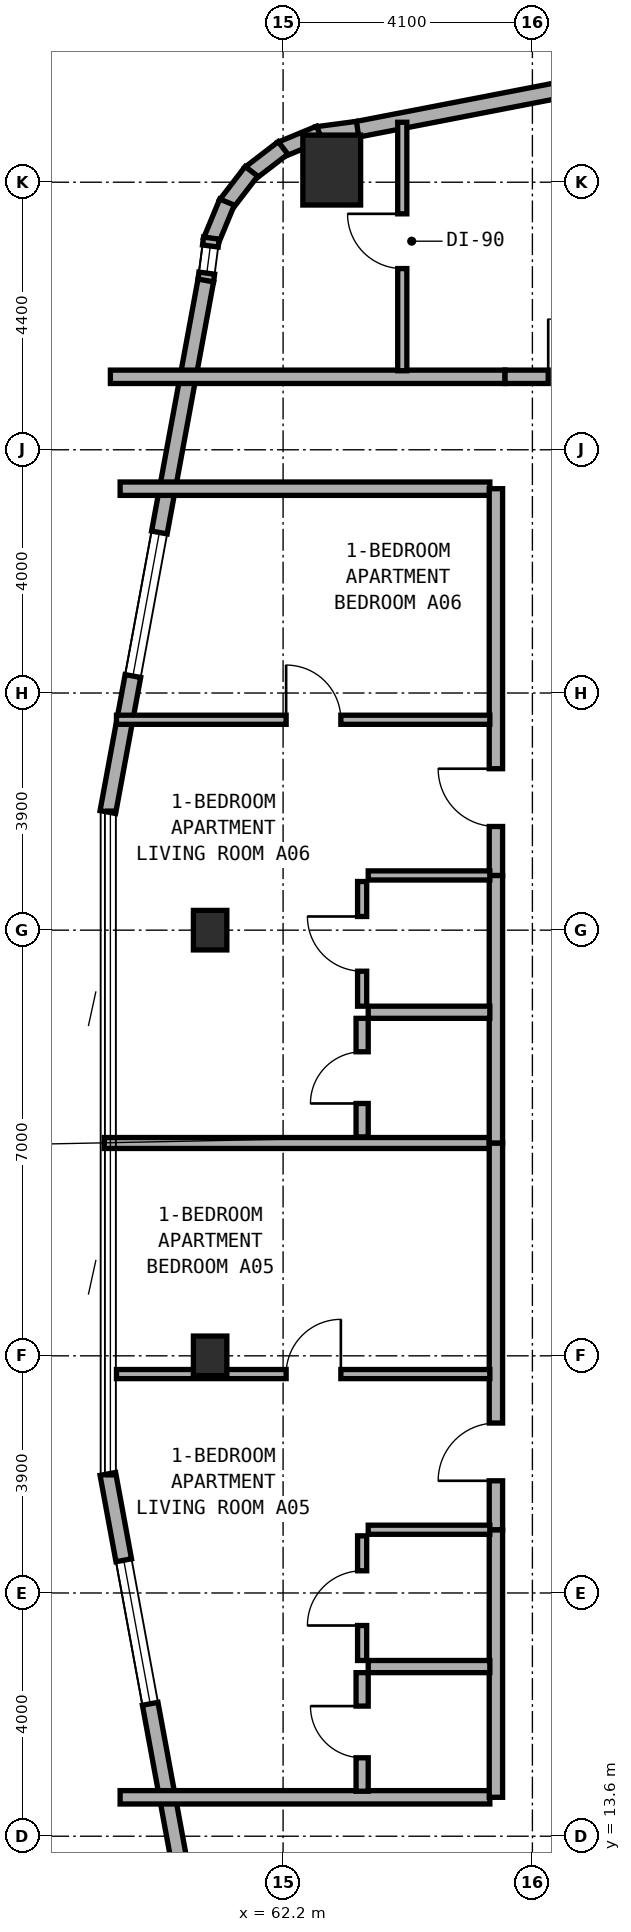
"""IFC4 building model, lengths in metres.
Left out: names, types, materials, properties, quantities, classifications, styles, units other than length and angle.
Written with IfcOpenShell. Run it as: python <this file> out.ifc"""

import sys

from ifc_helpers import new_model, si_unit, direction, frame, frame_2d, origin, origin_2d, place, context, subcontext, project, spatial, rectangle, extrude, element, fill, save


model = new_model("IFC4")
c1 = context("Model", 3, precision=1e-05, world=origin(), true_north=direction((0.0, 1.0)))
c2 = subcontext(c1, "Body", "Model", "MODEL_VIEW")
j1 = project(units=[si_unit("LENGTHUNIT", "METRE"), si_unit("PLANEANGLEUNIT", "RADIAN")], contexts=[c1])
p1 = place(None, origin())
s1 = spatial("IfcSite", under=j1, at=p1, CompositionType="ELEMENT")
p2 = place(p1, origin())
s2 = spatial("IfcBuilding", under=s1, at=p2, CompositionType="ELEMENT")
p3 = place(p2, frame((0.0, 0.0, 112.5)))
s3 = spatial("IfcBuildingStorey", under=s2, at=p3, CompositionType="ELEMENT", Elevation=112.5)
for number, where, z_axis, x_axis in (
    (1, (61.0, 21.5, 0.0), (0.0, 0.0, 1.0), (1.0, 0.0, 0.0)),
    (2, (61.0, 28.5, 0.0), (0.0, 0.0, 1.0), (1.0, 0.0, 0.0)),
):
    element("IfcColumn", number, at=place(p3, frame(where, z_axis=z_axis, x_axis=x_axis)), inside=s3, PredefinedType="COLUMN", context=c2, shape_type="SweptSolid", body=[
        extrude(rectangle(XDim=0.55, YDim=0.65, at=origin_2d()), origin(), (0.0, 0.0, 1.0), 3.5),
    ])
p4 = place(p3, frame((63.0, 41.0, 0.0), z_axis=(0.0, 0.0, 1.0), x_axis=(1.0, 0.0, 0.0)))
e3 = element("IfcColumn", 3, at=p4, inside=s3, PredefinedType="COLUMN", context=c2, shape_type="SweptSolid", body=[
    extrude(rectangle(XDim=0.95, YDim=1.15, at=origin_2d()), origin(), (0.0, 0.0, 1.0), 3.5),
])
p5 = place(p3, frame((71.71, 43.277, 0.0), z_axis=(0.0, 0.0, 1.0), x_axis=(-0.981733729692, -0.190260043057, 0.0)))
e4 = element("IfcWall", 4, at=p5, inside=s3, PredefinedType="STANDARD", context=c2, shape_type="SweptSolid", body=[
    extrude(rectangle(XDim=8.447, YDim=0.26, at=frame_2d((4.224, 0.0))), origin(), (0.0, 0.0, 1.0), 3.25),
])
p6 = place(p5, frame((2.608, 0.0, 0.8)))
e5 = element("IfcOpeningElement", 5, at=p6, cuts=e4, PredefinedType="OPENING", context=c2, shape_type="SweptSolid", body=[
    extrude(rectangle(XDim=2.4, YDim=1.6, at=frame_2d((1.2, 0.8))), frame((0.0, 0.14, 0.0), z_axis=(0.0, -1.0, 0.0), x_axis=(1.0, 0.0, 0.0)), (0.0, 0.0, 1.0), 0.28),
])
p7 = place(p3, frame((63.425, 41.672, 0.0), z_axis=(0.0, 0.0, 1.0), x_axis=(-0.991300187529, -0.13162043232, 0.0)))
e6 = element("IfcWall", 6, at=p7, inside=s3, PredefinedType="STANDARD", context=c2, shape_type="SweptSolid", body=[
    extrude(rectangle(XDim=0.677, YDim=0.26, at=frame_2d((0.338, 0.0))), origin(), (0.0, 0.0, 1.0), 3.25),
])
for number, where, z_axis, x_axis in (
    (7, (62.8, 41.601, 0.0), (0.0, 0.0, 1.0), (-0.924, -0.382, 0.0)),
    (8, (62.199, 41.364, 0.0), (0.0, 0.0, 1.0), (-0.793, -0.61, 0.0)),
    (9, (61.68, 40.979, 0.0), (0.0, 0.0, 1.0), (-0.609, -0.793, 0.0)),
):
    element("IfcWall", number, at=place(p3, frame(where, z_axis=z_axis, x_axis=x_axis)), inside=s3, PredefinedType="STANDARD", context=c2, shape_type="SweptSolid", body=[
        extrude(rectangle(XDim=0.694, YDim=0.26, at=frame_2d((0.347, 0.0))), origin(), (0.0, 0.0, 1.0), 3.25),
    ])
p8 = place(p3, frame((61.278, 40.473, 0.0), z_axis=(0.0, 0.0, 1.0), x_axis=(-0.382289608286, -0.924042561464, 0.0)))
e10 = element("IfcWall", 10, at=p8, inside=s3, PredefinedType="STANDARD", context=c2, shape_type="SweptSolid", body=[
    extrude(rectangle(XDim=0.694, YDim=0.26, at=frame_2d((0.347, 0.0))), origin(), (0.0, 0.0, 1.0), 3.25),
])
p9 = place(p3, frame((61.021, 39.881, 0.0), z_axis=(0.0, 0.0, 1.0), x_axis=(-0.130614135366, -0.991433279471, 0.0)))
e11 = element("IfcWall", 11, at=p9, inside=s3, PredefinedType="STANDARD", context=c2, shape_type="SweptSolid", body=[
    extrude(rectangle(XDim=0.712, YDim=0.26, at=frame_2d((0.356, 0.0))), origin(), (0.0, 0.0, 1.0), 3.25),
])
p10 = place(p9, frame((0.131, 0.0, 0.85)))
e12 = element("IfcOpeningElement", 12, at=p10, cuts=e11, PredefinedType="OPENING", context=c2, shape_type="SweptSolid", body=[
    extrude(rectangle(XDim=0.45, YDim=1.5, at=frame_2d((0.225, 0.75))), frame((0.0, 0.14, 0.0), z_axis=(0.0, -1.0, 0.0), x_axis=(1.0, 0.0, 0.0)), (0.0, 0.0, 1.0), 0.28),
])
p11 = place(p3, frame((60.929, 39.184, 0.0), z_axis=(0.0, 0.0, 1.0), x_axis=(-0.181209963057, -0.983444431215, 0.0)))
e13 = element("IfcWall", 13, at=p11, inside=s3, PredefinedType="STANDARD", context=c2, shape_type="SweptSolid", body=[
    extrude(rectangle(XDim=8.889, YDim=0.26, at=frame_2d((4.445, 0.0))), origin(), (0.0, 0.0, 1.0), 3.25),
])
p12 = place(p11, frame((4.214, 0.0, 0.8)))
e14 = element("IfcOpeningElement", 14, at=p12, cuts=e13, PredefinedType="OPENING", context=c2, shape_type="SweptSolid", body=[
    extrude(rectangle(XDim=2.4, YDim=1.6, at=frame_2d((1.2, 0.8))), frame((0.0, 0.14, 0.0), z_axis=(0.0, -1.0, 0.0), x_axis=(1.0, 0.0, 0.0)), (0.0, 0.0, 1.0), 0.28),
])
p13 = place(p3, frame((59.318, 19.558, 0.0), z_axis=(0.0, 0.0, 1.0), x_axis=(0.181209963057, -0.983444431215, 0.0)))
e15 = element("IfcWall", 15, at=p13, inside=s3, PredefinedType="STANDARD", context=c2, shape_type="SweptSolid", body=[
    extrude(rectangle(XDim=8.889, YDim=0.26, at=frame_2d((4.445, 0.0))), origin(), (0.0, 0.0, 1.0), 3.25),
])
p14 = place(p13, frame((1.444, 0.0, 0.8)))
e16 = element("IfcOpeningElement", 16, at=p14, cuts=e15, PredefinedType="OPENING", context=c2, shape_type="SweptSolid", body=[
    extrude(rectangle(XDim=2.4, YDim=1.6, at=frame_2d((1.2, 0.8))), frame((0.0, 0.14, 0.0), z_axis=(0.0, -1.0, 0.0), x_axis=(1.0, 0.0, 0.0)), (0.0, 0.0, 1.0), 0.28),
])
p15 = place(p3, frame((59.36, 37.6, 0.0), z_axis=(0.0, 0.0, 1.0), x_axis=(1.0, 0.0, 0.0)))
e17 = element("IfcWall", 17, at=p15, inside=s3, PredefinedType="SOLIDWALL", context=c2, shape_type="SweptSolid", body=[
    extrude(rectangle(XDim=6.49, YDim=0.22, at=frame_2d((3.245, 0.0))), origin(), (0.0, 0.0, 1.0), 2.945),
])
p16 = place(p3, frame((65.85, 37.6, 0.0), z_axis=(0.0, 0.0, 1.0), x_axis=(1.0, 0.0, 0.0)))
e18 = element("IfcWall", 18, at=p16, inside=s3, PredefinedType="SOLIDWALL", context=c2, shape_type="SweptSolid", body=[
    extrude(rectangle(XDim=2.37, YDim=0.22, at=frame_2d((1.185, 0.0))), origin(), (0.0, 0.0, 1.0), 3.22),
])
p17 = place(p16, frame((0.71, 0.0, 0.0)))
e19 = element("IfcOpeningElement", 19, at=p17, cuts=e18, PredefinedType="OPENING", context=c2, shape_type="SweptSolid", body=[
    extrude(rectangle(XDim=0.95, YDim=2.1, at=frame_2d((0.475, 1.05))), frame((0.0, 0.12, 0.0), z_axis=(0.0, -1.0, 0.0), x_axis=(1.0, 0.0, 0.0)), (0.0, 0.0, 1.0), 0.24),
])
p18 = place(p3, frame((64.16, 37.7, 0.0), z_axis=(0.0, 0.0, 1.0), x_axis=(0.0, 1.0, 0.0)))
e20 = element("IfcWall", 20, at=p18, inside=s3, PredefinedType="PARTITIONING", context=c2, shape_type="SweptSolid", body=[
    extrude(rectangle(XDim=4.086, YDim=0.15, at=frame_2d((2.043, 0.0))), origin(), (0.0, 0.0, 1.0), 2.945),
])
p19 = place(p18, frame((1.68, 0.0, 0.0)))
e21 = element("IfcOpeningElement", 21, at=p19, cuts=e20, PredefinedType="OPENING", context=c2, shape_type="SweptSolid", body=[
    extrude(rectangle(XDim=0.9, YDim=2.1, at=frame_2d((0.45, 1.05))), frame((0.0, 0.085, 0.0), z_axis=(0.0, -1.0, 0.0), x_axis=(1.0, 0.0, 0.0)), (0.0, 0.0, 1.0), 0.17),
])
for number, where, z_axis, x_axis in (
    (22, (59.52, 14.24, 0.0), (0.0, 0.0, 1.0), (1.0, 0.0, 0.0)),
    (23, (59.52, 35.76, 0.0), (0.0, 0.0, 1.0), (1.0, 0.0, 0.0)),
):
    element("IfcWall", number, at=place(p3, frame(where, z_axis=z_axis, x_axis=x_axis)), inside=s3, PredefinedType="SOLIDWALL", context=c2, shape_type="SweptSolid", body=[
        extrude(rectangle(XDim=6.08, YDim=0.22, at=frame_2d((3.04, 0.0))), origin(), (0.0, 0.0, 1.0), 2.945),
    ])
p20 = place(p3, frame((59.26, 25.0, 0.0), z_axis=(0.0, 0.0, 1.0), x_axis=(1.0, 0.0, 0.0)))
e24 = element("IfcWall", 24, at=p20, inside=s3, PredefinedType="SOLIDWALL", context=c2, shape_type="SweptSolid", body=[
    extrude(rectangle(XDim=6.44, YDim=0.18, at=frame_2d((3.22, 0.0))), origin(), (0.0, 0.0, 1.0), 2.945),
])
p21 = place(p3, frame((65.7, 14.24, 0.0), z_axis=(0.0, 0.0, 1.0), x_axis=(0.0, 1.0, 0.0)))
e25 = element("IfcWall", 25, at=p21, inside=s3, PredefinedType="SOLIDWALL", context=c2, shape_type="SweptSolid", body=[
    extrude(rectangle(XDim=4.4, YDim=0.22, at=frame_2d((2.2, 0.0))), origin(), (0.0, 0.0, 1.0), 3.22),
])
p22 = place(p3, frame((65.7, 18.64, 0.0), z_axis=(0.0, 0.0, 1.0), x_axis=(0.0, 1.0, 0.0)))
e26 = element("IfcWall", 26, at=p22, inside=s3, PredefinedType="SOLIDWALL", context=c2, shape_type="SweptSolid", body=[
    extrude(rectangle(XDim=6.36, YDim=0.22, at=frame_2d((3.18, 0.0))), origin(), (0.0, 0.0, 1.0), 2.825),
])
p23 = place(p22, frame((0.805, 0.0, 0.0)))
e27 = element("IfcOpeningElement", 27, at=p23, cuts=e26, PredefinedType="OPENING", context=c2, shape_type="SweptSolid", body=[
    extrude(rectangle(XDim=0.95, YDim=2.1, at=frame_2d((0.475, 1.05))), frame((0.0, 0.12, 0.0), z_axis=(0.0, -1.0, 0.0), x_axis=(1.0, 0.0, 0.0)), (0.0, 0.0, 1.0), 0.24),
])
p24 = place(p3, frame((59.46, 21.2, 0.0), z_axis=(0.0, 0.0, 1.0), x_axis=(1.0, 0.0, 0.0)))
e28 = element("IfcWall", 28, at=p24, inside=s3, PredefinedType="PARTITIONING", context=c2, shape_type="SweptSolid", body=[
    extrude(rectangle(XDim=6.14, YDim=0.15, at=frame_2d((3.07, 0.0))), origin(), (0.0, 0.0, 1.0), 2.945),
])
p25 = place(p24, frame((2.79, 0.0, 0.0)))
e29 = element("IfcOpeningElement", 29, at=p25, cuts=e28, PredefinedType="OPENING", context=c2, shape_type="SweptSolid", body=[
    extrude(rectangle(XDim=0.9, YDim=2.1, at=frame_2d((0.45, 1.05))), frame((0.0, 0.085, 0.0), z_axis=(0.0, -1.0, 0.0), x_axis=(1.0, 0.0, 0.0)), (0.0, 0.0, 1.0), 0.17),
])
p26 = place(p3, frame((63.6, 16.39, 0.0), z_axis=(0.0, 0.0, 1.0), x_axis=(1.0, 0.0, 0.0)))
e30 = element("IfcWall", 30, at=p26, inside=s3, PredefinedType="PLUMBINGWALL", context=c2, shape_type="SweptSolid", body=[
    extrude(rectangle(XDim=2.0, YDim=0.2, at=frame_2d((1.0, 0.0))), origin(), (0.0, 0.0, 1.0), 3.22),
])
p27 = place(p3, frame((63.6, 18.64, 0.0), z_axis=(0.0, 0.0, 1.0), x_axis=(1.0, 0.0, 0.0)))
e31 = element("IfcWall", 31, at=p27, inside=s3, PredefinedType="PARTITIONING", context=c2, shape_type="SweptSolid", body=[
    extrude(rectangle(XDim=2.0, YDim=0.15, at=frame_2d((1.0, 0.0))), origin(), (0.0, 0.0, 1.0), 3.22),
])
p28 = place(p3, frame((63.5, 14.34, 0.0), z_axis=(0.0, 0.0, 1.0), x_axis=(0.0, 1.0, 0.0)))
e32 = element("IfcWall", 32, at=p28, inside=s3, PredefinedType="PLUMBINGWALL", context=c2, shape_type="SweptSolid", body=[
    extrude(rectangle(XDim=1.95, YDim=0.2, at=frame_2d((0.975, 0.0))), origin(), (0.0, 0.0, 1.0), 3.22),
])
p29 = place(p28, frame((0.55, 0.0, 0.0)))
e33 = element("IfcOpeningElement", 33, at=p29, cuts=e32, PredefinedType="OPENING", context=c2, shape_type="SweptSolid", body=[
    extrude(rectangle(XDim=0.85, YDim=2.1, at=frame_2d((0.425, 1.05))), frame((0.0, 0.11, 0.0), z_axis=(0.0, -1.0, 0.0), x_axis=(1.0, 0.0, 0.0)), (0.0, 0.0, 1.0), 0.22),
])
p30 = place(p3, frame((63.5, 16.49, 0.0), z_axis=(0.0, 0.0, 1.0), x_axis=(0.0, 1.0, 0.0)))
e34 = element("IfcWall", 34, at=p30, inside=s3, PredefinedType="PARTITIONING", context=c2, shape_type="SweptSolid", body=[
    extrude(rectangle(XDim=2.05, YDim=0.15, at=frame_2d((1.025, 0.0))), origin(), (0.0, 0.0, 1.0), 3.22),
])
p31 = place(p30, frame((0.575, 0.0, 0.0)))
e35 = element("IfcOpeningElement", 35, at=p31, cuts=e34, PredefinedType="OPENING", context=c2, shape_type="SweptSolid", body=[
    extrude(rectangle(XDim=0.9, YDim=2.1, at=frame_2d((0.45, 1.05))), frame((0.0, 0.085, 0.0), z_axis=(0.0, -1.0, 0.0), x_axis=(1.0, 0.0, 0.0)), (0.0, 0.0, 1.0), 0.17),
])
p32 = place(p3, frame((65.7, 25.0, 0.0), z_axis=(0.0, 0.0, 1.0), x_axis=(0.0, 1.0, 0.0)))
e36 = element("IfcWall", 36, at=p32, inside=s3, PredefinedType="SOLIDWALL", context=c2, shape_type="SweptSolid", body=[
    extrude(rectangle(XDim=4.4, YDim=0.22, at=frame_2d((2.2, 0.0))), origin(), (0.0, 0.0, 1.0), 2.825),
])
p33 = place(p3, frame((65.7, 29.4, 0.0), z_axis=(0.0, 0.0, 1.0), x_axis=(0.0, 1.0, 0.0)))
e37 = element("IfcWall", 37, at=p33, inside=s3, PredefinedType="SOLIDWALL", context=c2, shape_type="SweptSolid", body=[
    extrude(rectangle(XDim=6.36, YDim=0.22, at=frame_2d((3.18, 0.0))), origin(), (0.0, 0.0, 1.0), 3.22),
])
p34 = place(p33, frame((0.805, 0.0, 0.0)))
e38 = element("IfcOpeningElement", 38, at=p34, cuts=e37, PredefinedType="OPENING", context=c2, shape_type="SweptSolid", body=[
    extrude(rectangle(XDim=0.95, YDim=2.1, at=frame_2d((0.475, 1.05))), frame((0.0, 0.12, 0.0), z_axis=(0.0, -1.0, 0.0), x_axis=(1.0, 0.0, 0.0)), (0.0, 0.0, 1.0), 0.24),
])
p35 = place(p3, frame((59.46, 31.96, 0.0), z_axis=(0.0, 0.0, 1.0), x_axis=(1.0, 0.0, 0.0)))
e39 = element("IfcWall", 39, at=p35, inside=s3, PredefinedType="PARTITIONING", context=c2, shape_type="SweptSolid", body=[
    extrude(rectangle(XDim=6.14, YDim=0.15, at=frame_2d((3.07, 0.0))), origin(), (0.0, 0.0, 1.0), 2.945),
])
p36 = place(p35, frame((2.79, 0.0, 0.0)))
e40 = element("IfcOpeningElement", 40, at=p36, cuts=e39, PredefinedType="OPENING", context=c2, shape_type="SweptSolid", body=[
    extrude(rectangle(XDim=0.9, YDim=2.1, at=frame_2d((0.45, 1.05))), frame((0.0, 0.085, 0.0), z_axis=(0.0, -1.0, 0.0), x_axis=(1.0, 0.0, 0.0)), (0.0, 0.0, 1.0), 0.17),
])
p37 = place(p3, frame((63.6, 27.15, 0.0), z_axis=(0.0, 0.0, 1.0), x_axis=(1.0, 0.0, 0.0)))
e41 = element("IfcWall", 41, at=p37, inside=s3, PredefinedType="PLUMBINGWALL", context=c2, shape_type="SweptSolid", body=[
    extrude(rectangle(XDim=2.0, YDim=0.2, at=frame_2d((1.0, 0.0))), origin(), (0.0, 0.0, 1.0), 3.22),
])
p38 = place(p3, frame((63.6, 29.4, 0.0), z_axis=(0.0, 0.0, 1.0), x_axis=(1.0, 0.0, 0.0)))
e42 = element("IfcWall", 42, at=p38, inside=s3, PredefinedType="PARTITIONING", context=c2, shape_type="SweptSolid", body=[
    extrude(rectangle(XDim=2.0, YDim=0.15, at=frame_2d((1.0, 0.0))), origin(), (0.0, 0.0, 1.0), 3.22),
])
p39 = place(p3, frame((63.5, 25.1, 0.0), z_axis=(0.0, 0.0, 1.0), x_axis=(0.0, 1.0, 0.0)))
e43 = element("IfcWall", 43, at=p39, inside=s3, PredefinedType="PLUMBINGWALL", context=c2, shape_type="SweptSolid", body=[
    extrude(rectangle(XDim=1.95, YDim=0.2, at=frame_2d((0.975, 0.0))), origin(), (0.0, 0.0, 1.0), 3.22),
])
p40 = place(p39, frame((0.55, 0.0, 0.0)))
e44 = element("IfcOpeningElement", 44, at=p40, cuts=e43, PredefinedType="OPENING", context=c2, shape_type="SweptSolid", body=[
    extrude(rectangle(XDim=0.85, YDim=2.1, at=frame_2d((0.425, 1.05))), frame((0.0, 0.11, 0.0), z_axis=(0.0, -1.0, 0.0), x_axis=(1.0, 0.0, 0.0)), (0.0, 0.0, 1.0), 0.22),
])
p41 = place(p3, frame((63.5, 27.25, 0.0), z_axis=(0.0, 0.0, 1.0), x_axis=(0.0, 1.0, 0.0)))
e45 = element("IfcWall", 45, at=p41, inside=s3, PredefinedType="PARTITIONING", context=c2, shape_type="SweptSolid", body=[
    extrude(rectangle(XDim=2.05, YDim=0.15, at=frame_2d((1.025, 0.0))), origin(), (0.0, 0.0, 1.0), 2.825),
])
p42 = place(p41, frame((0.575, 0.0, 0.0)))
e46 = element("IfcOpeningElement", 46, at=p42, cuts=e45, PredefinedType="OPENING", context=c2, shape_type="SweptSolid", body=[
    extrude(rectangle(XDim=0.9, YDim=2.1, at=frame_2d((0.45, 1.05))), frame((0.0, 0.085, 0.0), z_axis=(0.0, -1.0, 0.0), x_axis=(1.0, 0.0, 0.0)), (0.0, 0.0, 1.0), 0.17),
])
p43 = place(p12, origin())
e47 = element("IfcWindow", 47, at=p43, inside=s3, PartitioningType="SINGLE_PANEL", PredefinedType="WINDOW", context=c2, shape_type="SweptSolid", body=[
    extrude(rectangle(XDim=2.4, YDim=1.6, at=frame_2d((1.2, 0.8))), frame((0.0, 0.03, 0.0), z_axis=(0.0, -1.0, 0.0), x_axis=(1.0, 0.0, 0.0)), (0.0, 0.0, 1.0), 0.06),
])
fill(e14, e47)
p44 = place(p14, origin())
e48 = element("IfcWindow", 48, at=p44, inside=s3, PartitioningType="SINGLE_PANEL", PredefinedType="WINDOW", context=c2, shape_type="SweptSolid", body=[
    extrude(rectangle(XDim=2.4, YDim=1.6, at=frame_2d((1.2, 0.8))), frame((0.0, 0.03, 0.0), z_axis=(0.0, -1.0, 0.0), x_axis=(1.0, 0.0, 0.0)), (0.0, 0.0, 1.0), 0.06),
])
fill(e16, e48)
p45 = place(p10, origin())
e49 = element("IfcWindow", 49, at=p45, inside=s3, PartitioningType="SINGLE_PANEL", PredefinedType="WINDOW", context=c2, shape_type="SweptSolid", body=[
    extrude(rectangle(XDim=0.45, YDim=1.5, at=frame_2d((0.225, 0.75))), frame((0.0, 0.03, 0.0), z_axis=(0.0, -1.0, 0.0), x_axis=(1.0, 0.0, 0.0)), (0.0, 0.0, 1.0), 0.06),
])
fill(e12, e49)
p46 = place(p17, origin())
e50 = element("IfcDoor", 50, at=p46, inside=s3, OperationType="SINGLE_SWING_LEFT", PredefinedType="DOOR", context=c2, shape_type="SweptSolid", body=[
    extrude(rectangle(XDim=0.95, YDim=2.1, at=frame_2d((0.475, 1.05))), frame((0.0, 0.025, 0.0), z_axis=(0.0, -1.0, 0.0), x_axis=(1.0, 0.0, 0.0)), (0.0, 0.0, 1.0), 0.05),
])
fill(e19, e50)
p47 = place(p19, origin())
e51 = element("IfcDoor", 51, at=p47, inside=s3, OperationType="SINGLE_SWING_RIGHT", PredefinedType="DOOR", context=c2, shape_type="SweptSolid", body=[
    extrude(rectangle(XDim=0.9, YDim=2.1, at=frame_2d((0.45, 1.05))), frame((0.0, 0.025, 0.0), z_axis=(0.0, -1.0, 0.0), x_axis=(1.0, 0.0, 0.0)), (0.0, 0.0, 1.0), 0.05),
])
fill(e21, e51)
p48 = place(p23, origin())
e52 = element("IfcDoor", 52, at=p48, inside=s3, OperationType="SINGLE_SWING_LEFT", PredefinedType="DOOR", context=c2, shape_type="SweptSolid", body=[
    extrude(rectangle(XDim=0.95, YDim=2.1, at=frame_2d((0.475, 1.05))), frame((0.0, 0.025, 0.0), z_axis=(0.0, -1.0, 0.0), x_axis=(1.0, 0.0, 0.0)), (0.0, 0.0, 1.0), 0.05),
])
fill(e27, e52)
p49 = place(p25, origin())
e53 = element("IfcDoor", 53, at=p49, inside=s3, OperationType="SINGLE_SWING_RIGHT", PredefinedType="DOOR", context=c2, shape_type="SweptSolid", body=[
    extrude(rectangle(XDim=0.9, YDim=2.1, at=frame_2d((0.45, 1.05))), frame((0.0, 0.025, 0.0), z_axis=(0.0, -1.0, 0.0), x_axis=(1.0, 0.0, 0.0)), (0.0, 0.0, 1.0), 0.05),
])
fill(e29, e53)
p50 = place(p29, origin())
e54 = element("IfcDoor", 54, at=p50, inside=s3, OperationType="SINGLE_SWING_RIGHT", PredefinedType="DOOR", context=c2, shape_type="SweptSolid", body=[
    extrude(rectangle(XDim=0.85, YDim=2.1, at=frame_2d((0.425, 1.05))), frame((0.0, 0.025, 0.0), z_axis=(0.0, -1.0, 0.0), x_axis=(1.0, 0.0, 0.0)), (0.0, 0.0, 1.0), 0.05),
])
fill(e33, e54)
p51 = place(p31, origin())
e55 = element("IfcDoor", 55, at=p51, inside=s3, OperationType="SINGLE_SWING_LEFT", PredefinedType="DOOR", context=c2, shape_type="SweptSolid", body=[
    extrude(rectangle(XDim=0.9, YDim=2.1, at=frame_2d((0.45, 1.05))), frame((0.0, 0.025, 0.0), z_axis=(0.0, -1.0, 0.0), x_axis=(1.0, 0.0, 0.0)), (0.0, 0.0, 1.0), 0.05),
])
fill(e35, e55)
p52 = place(p34, origin())
e56 = element("IfcDoor", 56, at=p52, inside=s3, OperationType="SINGLE_SWING_RIGHT", PredefinedType="DOOR", context=c2, shape_type="SweptSolid", body=[
    extrude(rectangle(XDim=0.95, YDim=2.1, at=frame_2d((0.475, 1.05))), frame((0.0, 0.025, 0.0), z_axis=(0.0, -1.0, 0.0), x_axis=(1.0, 0.0, 0.0)), (0.0, 0.0, 1.0), 0.05),
])
fill(e38, e56)
p53 = place(p36, origin())
e57 = element("IfcDoor", 57, at=p53, inside=s3, OperationType="SINGLE_SWING_LEFT", PredefinedType="DOOR", context=c2, shape_type="SweptSolid", body=[
    extrude(rectangle(XDim=0.9, YDim=2.1, at=frame_2d((0.45, 1.05))), frame((0.0, 0.025, 0.0), z_axis=(0.0, -1.0, 0.0), x_axis=(1.0, 0.0, 0.0)), (0.0, 0.0, 1.0), 0.05),
])
fill(e40, e57)
p54 = place(p40, origin())
e58 = element("IfcDoor", 58, at=p54, inside=s3, OperationType="SINGLE_SWING_LEFT", PredefinedType="DOOR", context=c2, shape_type="SweptSolid", body=[
    extrude(rectangle(XDim=0.85, YDim=2.1, at=frame_2d((0.425, 1.05))), frame((0.0, 0.025, 0.0), z_axis=(0.0, -1.0, 0.0), x_axis=(1.0, 0.0, 0.0)), (0.0, 0.0, 1.0), 0.05),
])
fill(e44, e58)
p55 = place(p42, origin())
e59 = element("IfcDoor", 59, at=p55, inside=s3, OperationType="SINGLE_SWING_RIGHT", PredefinedType="DOOR", context=c2, shape_type="SweptSolid", body=[
    extrude(rectangle(XDim=0.9, YDim=2.1, at=frame_2d((0.45, 1.05))), frame((0.0, 0.025, 0.0), z_axis=(0.0, -1.0, 0.0), x_axis=(1.0, 0.0, 0.0)), (0.0, 0.0, 1.0), 0.05),
])
fill(e46, e59)
save(model, sys.argv[1])
